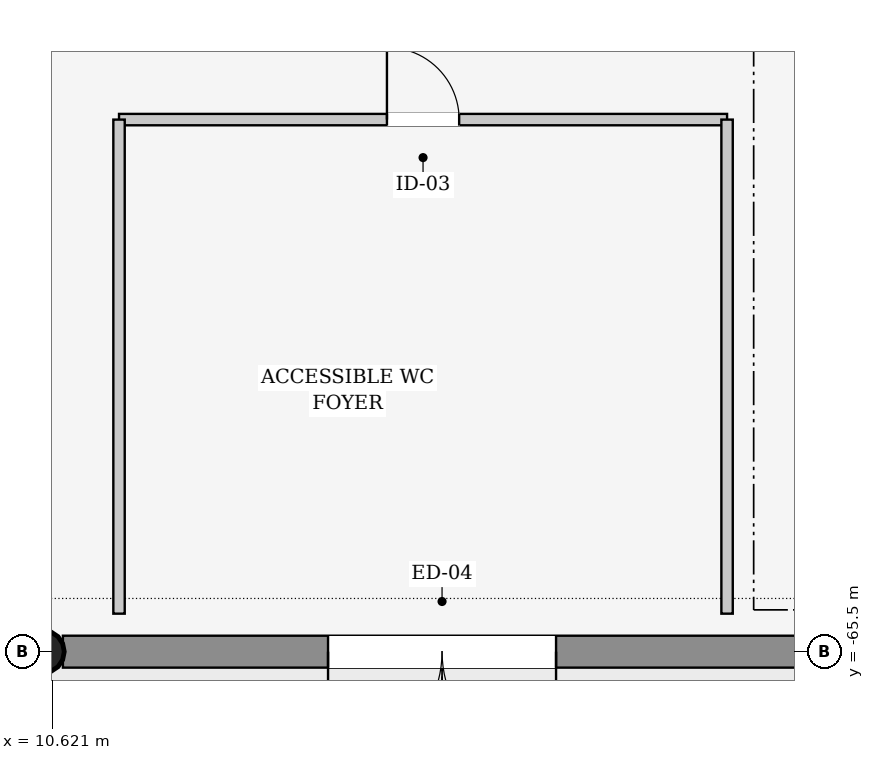
"""IFC4 building model, lengths in metres.
Left out: names, types, materials, properties, quantities, classifications, styles, units other than length and angle.
Written with IfcOpenShell. Run it as: python <this file> out.ifc"""

import sys

from ifc_helpers import new_model, si_unit, direction, frame, frame_2d, origin, origin_2d, place, context, subcontext, project, spatial, rectangle, hollow_circle, extrude, element, fill, save


model = new_model("IFC4")
c1 = context("Model", 3, precision=1e-05, world=origin(), true_north=direction((0.0, 1.0)))
c2 = subcontext(c1, "Body", "Model", "MODEL_VIEW")
j1 = project(units=[si_unit("LENGTHUNIT", "METRE"), si_unit("PLANEANGLEUNIT", "RADIAN")], contexts=[c1])
p1 = place(None, origin())
s1 = spatial("IfcSite", under=j1, at=p1, CompositionType="ELEMENT")
p2 = place(p1, origin())
s2 = spatial("IfcBuilding", under=s1, at=p2, CompositionType="ELEMENT")
p3 = place(p2, origin())
s3 = spatial("IfcBuildingStorey", under=s2, at=p3, CompositionType="ELEMENT", Elevation=0.0)
p4 = place(p3, frame((10.5, -65.5, 0.0), z_axis=(0.0, 0.0, 1.0), x_axis=(1.0, 0.0, 0.0)))
e1 = element("IfcColumn", 1, at=p4, inside=s3, PredefinedType="COLUMN", context=c2, shape_type="SweptSolid", body=[
    extrude(hollow_circle(Radius=0.28, WallThickness=0.02, at=origin_2d()), origin(), (0.0, 0.0, 1.0), 6.0),
])
p5 = place(p3, frame((20.739, -65.5, 0.0), z_axis=(0.0, 0.0, 1.0), x_axis=(-1.0, 0.0, 0.0)))
e2 = element("IfcWall", 2, at=p5, inside=s3, PredefinedType="SOLIDWALL", context=c2, shape_type="SweptSolid", body=[
    extrude(rectangle(XDim=9.977, YDim=0.42, at=frame_2d((4.989, 0.0))), origin(), (0.0, 0.0, 1.0), 4.74),
])
p6 = place(p5, frame((3.489, 0.0, 0.0)))
e3 = element("IfcOpeningElement", 3, at=p6, cuts=e2, PredefinedType="OPENING", context=c2, shape_type="SweptSolid", body=[
    extrude(rectangle(XDim=3.0, YDim=3.2, at=frame_2d((1.5, 1.6))), frame((0.0, 0.22, 0.0), z_axis=(0.0, -1.0, 0.0), x_axis=(1.0, 0.0, 0.0)), (0.0, 0.0, 1.0), 0.44),
])
p7 = place(p3, frame((11.5, -58.5, 0.0), z_axis=(0.0, 0.0, 1.0), x_axis=(1.0, 0.0, 0.0)))
e4 = element("IfcWall", 4, at=p7, inside=s3, PredefinedType="PARTITIONING", context=c2, shape_type="SweptSolid", body=[
    extrude(rectangle(XDim=8.0, YDim=0.15, at=frame_2d((4.0, 0.0))), origin(), (0.0, 0.0, 1.0), 5.64),
])
p8 = place(p7, frame((3.525, 0.0, 0.0)))
e5 = element("IfcOpeningElement", 5, at=p8, cuts=e4, PredefinedType="OPENING", context=c2, shape_type="SweptSolid", body=[
    extrude(rectangle(XDim=0.95, YDim=2.15, at=frame_2d((0.475, 1.075))), frame((0.0, 0.085, 0.0), z_axis=(0.0, -1.0, 0.0), x_axis=(1.0, 0.0, 0.0)), (0.0, 0.0, 1.0), 0.17),
])
for number, where, z_axis, x_axis in (
    (6, (19.5, -58.5, 0.0), (0.0, 0.0, 1.0), (0.0, -1.0, 0.0)),
    (7, (11.5, -65.0, 0.0), (0.0, 0.0, 1.0), (0.0, 1.0, 0.0)),
):
    element("IfcWall", number, at=place(p3, frame(where, z_axis=z_axis, x_axis=x_axis)), inside=s3, PredefinedType="PARTITIONING", context=c2, shape_type="SweptSolid", body=[
        extrude(rectangle(XDim=6.5, YDim=0.15, at=frame_2d((3.25, 0.0))), origin(), (0.0, 0.0, 1.0), 4.825),
    ])
p9 = place(p6, origin())
e8 = element("IfcDoor", 8, at=p9, inside=s3, OperationType="DOUBLE_DOOR_SINGLE_SWING", PredefinedType="DOOR", context=c2, shape_type="SweptSolid", body=[
    extrude(rectangle(XDim=3.0, YDim=3.2, at=frame_2d((1.5, 1.6))), frame((0.0, 0.025, 0.0), z_axis=(0.0, -1.0, 0.0), x_axis=(1.0, 0.0, 0.0)), (0.0, 0.0, 1.0), 0.05),
])
fill(e3, e8)
p10 = place(p8, origin())
e9 = element("IfcDoor", 9, at=p10, inside=s3, OperationType="SINGLE_SWING_LEFT", PredefinedType="DOOR", context=c2, shape_type="SweptSolid", body=[
    extrude(rectangle(XDim=0.95, YDim=2.15, at=frame_2d((0.475, 1.075))), frame((0.0, 0.025, 0.0), z_axis=(0.0, -1.0, 0.0), x_axis=(1.0, 0.0, 0.0)), (0.0, 0.0, 1.0), 0.05),
])
fill(e5, e9)
save(model, sys.argv[1])
